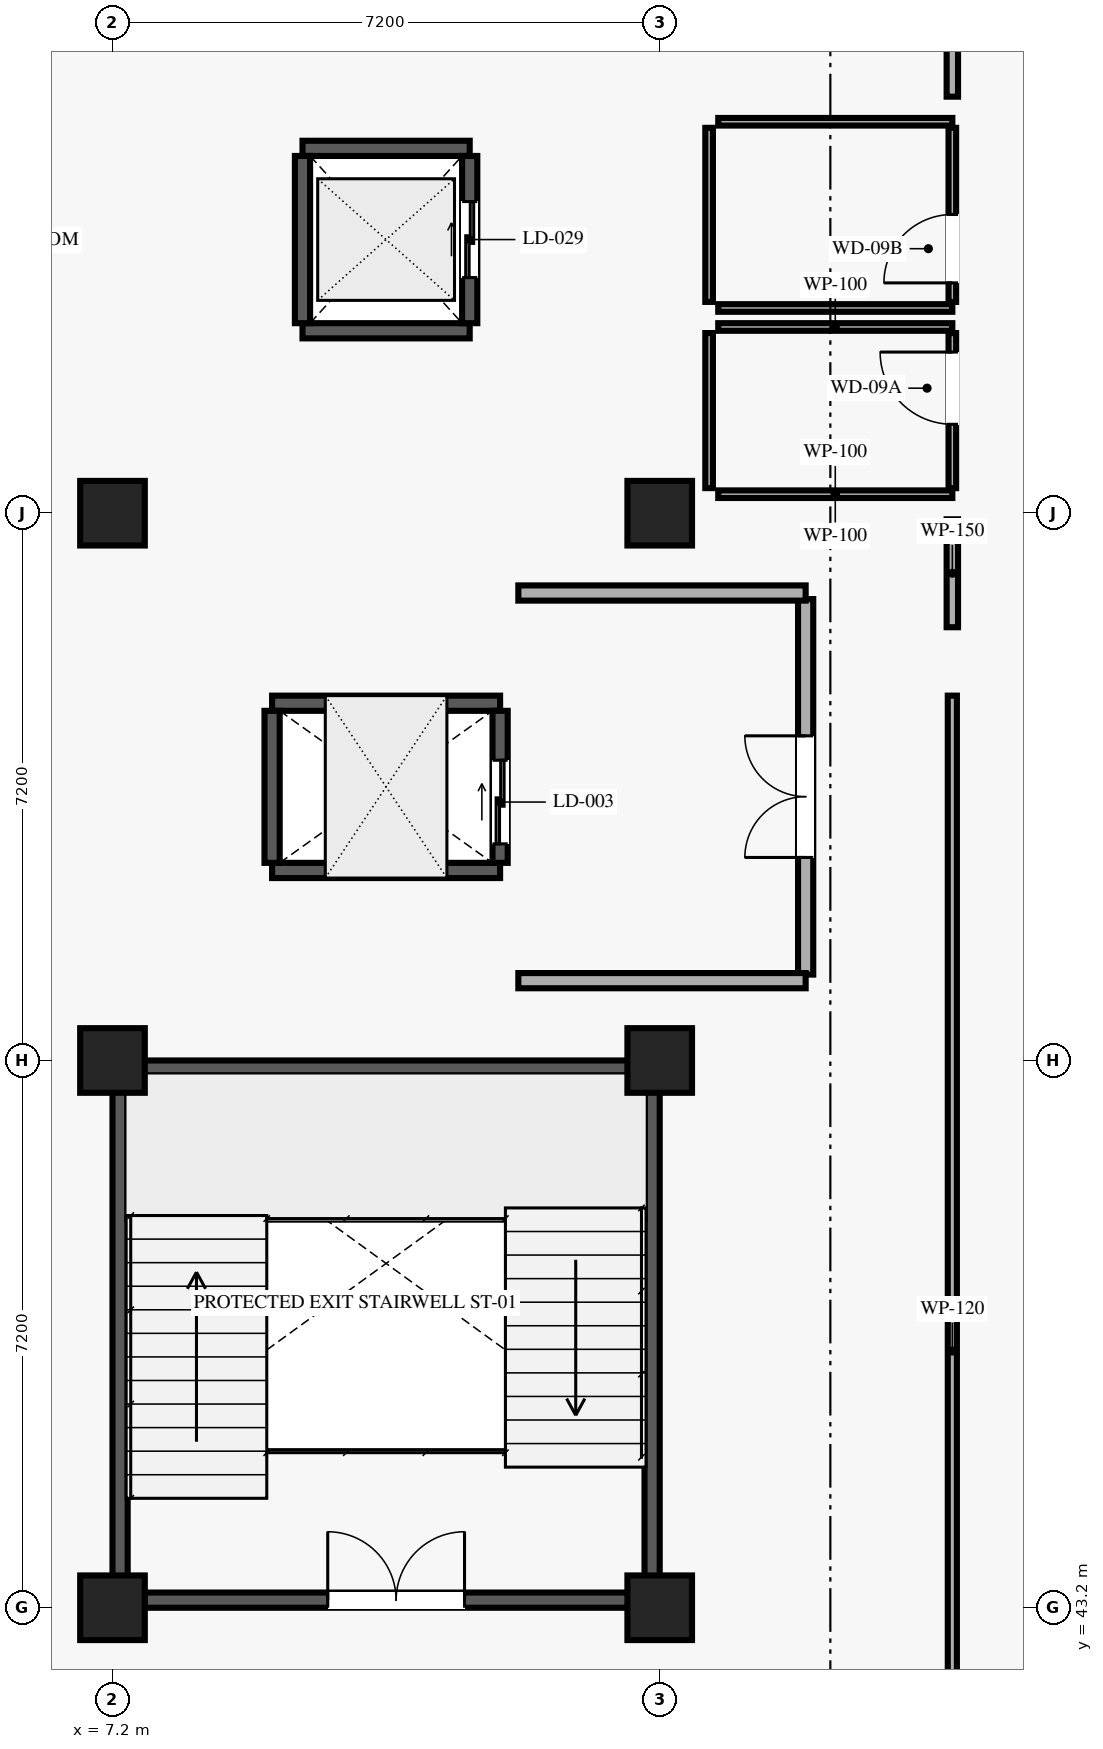
"""IFC4 building model, lengths in metres.
Left out: names, types, materials, properties, quantities, classifications, styles, units other than length and angle.
Written with IfcOpenShell. Run it as: python <this file> out.ifc"""

import sys

from ifc_helpers import new_model, si_unit, direction, frame, frame_2d, origin, origin_2d, place, context, subcontext, project, spatial, rectangle, extrude, element, fill, save


model = new_model("IFC4")
c1 = context("Model", 3, precision=1e-05, world=origin(), true_north=direction((0.0, 1.0)))
c2 = subcontext(c1, "Body", "Model", "MODEL_VIEW")
j1 = project(units=[si_unit("LENGTHUNIT", "METRE"), si_unit("PLANEANGLEUNIT", "RADIAN")], contexts=[c1])
p1 = place(None, origin())
s1 = spatial("IfcSite", under=j1, at=p1, CompositionType="ELEMENT")
p2 = place(p1, origin())
s2 = spatial("IfcBuilding", under=s1, at=p2, CompositionType="ELEMENT")
p3 = place(p2, frame((0.0, 0.0, 5.4)))
s3 = spatial("IfcBuildingStorey", under=s2, at=p3, CompositionType="ELEMENT", Elevation=5.4)
for number, where, z_axis, x_axis in (
    (1, (7.2, 43.2, 0.0), (0.0, 0.0, 1.0), (1.0, 0.0, 0.0)),
    (2, (7.2, 50.4, 0.0), (0.0, 0.0, 1.0), (1.0, 0.0, 0.0)),
    (3, (7.2, 57.6, 0.0), (0.0, 0.0, 1.0), (1.0, 0.0, 0.0)),
    (4, (14.4, 43.2, 0.0), (0.0, 0.0, 1.0), (1.0, 0.0, 0.0)),
    (5, (14.4, 50.4, 0.0), (0.0, 0.0, 1.0), (1.0, 0.0, 0.0)),
    (6, (14.4, 57.6, 0.0), (0.0, 0.0, 1.0), (1.0, 0.0, 0.0)),
):
    element("IfcColumn", number, at=place(p3, frame(where, z_axis=z_axis, x_axis=x_axis)), inside=s3, PredefinedType="COLUMN", context=c2, shape_type="SweptSolid", body=[
        extrude(rectangle(XDim=0.85, YDim=0.85, at=origin_2d()), origin(), (0.0, 0.0, 1.0), 4.05),
    ])
p4 = place(p3, frame((7.4, 43.3, 0.0), z_axis=(0.0, 0.0, 1.0), x_axis=(1.0, 0.0, 0.0)))
e7 = element("IfcWall", 7, at=p4, inside=s3, PredefinedType="SHEAR", context=c2, shape_type="SweptSolid", body=[
    extrude(rectangle(XDim=6.8, YDim=0.2, at=frame_2d((3.4, 0.0))), origin(), (0.0, 0.0, 1.0), 3.81),
])
p5 = place(p4, frame((2.632, 0.0, 0.0)))
e8 = element("IfcOpeningElement", 8, at=p5, cuts=e7, PredefinedType="OPENING", context=c2, shape_type="SweptSolid", body=[
    extrude(rectangle(XDim=1.8, YDim=2.2, at=frame_2d((0.9, 1.1))), frame((0.0, 0.11, 0.0), z_axis=(0.0, -1.0, 0.0), x_axis=(1.0, 0.0, 0.0)), (0.0, 0.0, 1.0), 0.22),
])
for number, where, z_axis, x_axis in (
    (9, (7.4, 50.3, 0.0), (0.0, 0.0, 1.0), (1.0, 0.0, 0.0)),
    (10, (7.3, 43.4, 0.0), (0.0, 0.0, 1.0), (0.0, 1.0, 0.0)),
    (11, (14.3, 43.4, 0.0), (0.0, 0.0, 1.0), (0.0, 1.0, 0.0)),
):
    element("IfcWall", number, at=place(p3, frame(where, z_axis=z_axis, x_axis=x_axis)), inside=s3, PredefinedType="SHEAR", context=c2, shape_type="SweptSolid", body=[
        extrude(rectangle(XDim=6.8, YDim=0.2, at=frame_2d((3.4, 0.0))), origin(), (0.0, 0.0, 1.0), 3.81),
    ])
for number, where, z_axis, x_axis in (
    (12, (9.3, 52.9, 0.0), (0.0, 0.0, 1.0), (1.0, 0.0, 0.0)),
    (13, (9.3, 55.1, 0.0), (0.0, 0.0, 1.0), (1.0, 0.0, 0.0)),
):
    element("IfcWall", number, at=place(p3, frame(where, z_axis=z_axis, x_axis=x_axis)), inside=s3, PredefinedType="SHEAR", context=c2, shape_type="SweptSolid", body=[
        extrude(rectangle(XDim=3.0, YDim=0.2, at=frame_2d((1.5, 0.0))), origin(), (0.0, 0.0, 1.0), 3.81),
    ])
p6 = place(p3, frame((9.3, 53.0, 0.0), z_axis=(0.0, 0.0, 1.0), x_axis=(0.0, 1.0, 0.0)))
e14 = element("IfcWall", 14, at=p6, inside=s3, PredefinedType="SHEAR", context=c2, shape_type="SweptSolid", body=[
    extrude(rectangle(XDim=2.0, YDim=0.2, at=frame_2d((1.0, 0.0))), origin(), (0.0, 0.0, 1.0), 3.81),
])
p7 = place(p3, frame((12.3, 53.0, 0.0), z_axis=(0.0, 0.0, 1.0), x_axis=(0.0, 1.0, 0.0)))
e15 = element("IfcWall", 15, at=p7, inside=s3, PredefinedType="SHEAR", context=c2, shape_type="SweptSolid", body=[
    extrude(rectangle(XDim=2.0, YDim=0.2, at=frame_2d((1.0, 0.0))), origin(), (0.0, 0.0, 1.0), 3.81),
])
p8 = place(p7, frame((0.25, 0.0, 0.0)))
e16 = element("IfcOpeningElement", 16, at=p8, cuts=e15, PredefinedType="OPENING", context=c2, shape_type="SweptSolid", body=[
    extrude(rectangle(XDim=1.1, YDim=2.15, at=frame_2d((0.55, 1.075))), frame((0.0, 0.11, 0.0), z_axis=(0.0, -1.0, 0.0), x_axis=(1.0, 0.0, 0.0)), (0.0, 0.0, 1.0), 0.22),
])
for number, where, z_axis, x_axis in (
    (17, (9.7, 60.0, 0.0), (0.0, 0.0, 1.0), (1.0, 0.0, 0.0)),
    (18, (9.7, 62.4, 0.0), (0.0, 0.0, 1.0), (1.0, 0.0, 0.0)),
    (19, (9.7, 60.1, 0.0), (0.0, 0.0, 1.0), (0.0, 1.0, 0.0)),
):
    element("IfcWall", number, at=place(p3, frame(where, z_axis=z_axis, x_axis=x_axis)), inside=s3, PredefinedType="SHEAR", context=c2, shape_type="SweptSolid", body=[
        extrude(rectangle(XDim=2.2, YDim=0.2, at=frame_2d((1.1, 0.0))), origin(), (0.0, 0.0, 1.0), 3.81),
    ])
p9 = place(p3, frame((11.9, 60.1, 0.0), z_axis=(0.0, 0.0, 1.0), x_axis=(0.0, 1.0, 0.0)))
e20 = element("IfcWall", 20, at=p9, inside=s3, PredefinedType="SHEAR", context=c2, shape_type="SweptSolid", body=[
    extrude(rectangle(XDim=2.2, YDim=0.2, at=frame_2d((1.1, 0.0))), origin(), (0.0, 0.0, 1.0), 3.81),
])
p10 = place(p9, frame((0.6, 0.0, 0.0)))
e21 = element("IfcOpeningElement", 21, at=p10, cuts=e20, PredefinedType="OPENING", context=c2, shape_type="SweptSolid", body=[
    extrude(rectangle(XDim=1.0, YDim=2.1, at=frame_2d((0.5, 1.05))), frame((0.0, 0.11, 0.0), z_axis=(0.0, -1.0, 0.0), x_axis=(1.0, 0.0, 0.0)), (0.0, 0.0, 1.0), 0.22),
])
p11 = place(p3, frame((16.32, 51.53, 0.0), z_axis=(0.0, 0.0, 1.0), x_axis=(0.0, 1.0, 0.0)))
e22 = element("IfcWall", 22, at=p11, inside=s3, PredefinedType="SOLIDWALL", context=c2, shape_type="SweptSolid", body=[
    extrude(rectangle(XDim=4.94, YDim=0.2, at=frame_2d((2.47, 0.0))), origin(), (0.0, 0.0, 1.0), 3.81),
])
p12 = place(p11, frame((1.541, 0.0, 0.0)))
e23 = element("IfcOpeningElement", 23, at=p12, cuts=e22, PredefinedType="OPENING", context=c2, shape_type="SweptSolid", body=[
    extrude(rectangle(XDim=1.6, YDim=2.2, at=frame_2d((0.8, 1.1))), frame((0.0, 0.11, 0.0), z_axis=(0.0, -1.0, 0.0), x_axis=(1.0, 0.0, 0.0)), (0.0, 0.0, 1.0), 0.22),
])
for number, where, z_axis, x_axis in (
    (24, (12.54, 51.45, 0.0), (0.0, 0.0, 1.0), (1.0, 0.0, 0.0)),
    (25, (12.54, 56.55, 0.0), (0.0, 0.0, 1.0), (1.0, 0.0, 0.0)),
):
    element("IfcWall", number, at=place(p3, frame(where, z_axis=z_axis, x_axis=x_axis)), inside=s3, PredefinedType="SOLIDWALL", context=c2, shape_type="SweptSolid", body=[
        extrude(rectangle(XDim=3.78, YDim=0.2, at=frame_2d((1.89, 0.0))), origin(), (0.0, 0.0, 1.0), 3.81),
    ])
p13 = place(p3, frame((18.25, 57.93, 0.0), z_axis=(0.0, 0.0, 1.0), x_axis=(0.0, 1.0, 0.0)))
e26 = element("IfcWall", 26, at=p13, inside=s3, PredefinedType="PARTITIONING", context=c2, shape_type="SweptSolid", body=[
    extrude(rectangle(XDim=2.04, YDim=0.1, at=frame_2d((1.02, 0.0))), origin(), (0.0, 0.0, 1.0), 3.81),
])
p14 = place(p13, frame((0.84, 0.0, 0.0)))
e27 = element("IfcOpeningElement", 27, at=p14, cuts=e26, PredefinedType="OPENING", context=c2, shape_type="SweptSolid", body=[
    extrude(rectangle(XDim=0.95, YDim=2.1, at=frame_2d((0.475, 1.05))), frame((0.0, 0.06, 0.0), z_axis=(0.0, -1.0, 0.0), x_axis=(1.0, 0.0, 0.0)), (0.0, 0.0, 1.0), 0.12),
])
p15 = place(p3, frame((15.17, 57.85, 0.0), z_axis=(0.0, 0.0, 1.0), x_axis=(1.0, 0.0, 0.0)))
e28 = element("IfcWall", 28, at=p15, inside=s3, PredefinedType="PARTITIONING", context=c2, shape_type="SweptSolid", body=[
    extrude(rectangle(XDim=3.08, YDim=0.1, at=frame_2d((1.54, 0.0))), origin(), (0.0, 0.0, 1.0), 3.2),
])
p16 = place(p3, frame((15.17, 60.05, 0.0), z_axis=(0.0, 0.0, 1.0), x_axis=(1.0, 0.0, 0.0)))
e29 = element("IfcWall", 29, at=p16, inside=s3, PredefinedType="PARTITIONING", context=c2, shape_type="SweptSolid", body=[
    extrude(rectangle(XDim=3.08, YDim=0.1, at=frame_2d((1.54, 0.0))), origin(), (0.0, 0.0, 1.0), 3.81),
])
p17 = place(p3, frame((15.05, 57.93, 0.0), z_axis=(0.0, 0.0, 1.0), x_axis=(0.0, 1.0, 0.0)))
e30 = element("IfcWall", 30, at=p17, inside=s3, PredefinedType="PARTITIONING", context=c2, shape_type="SweptSolid", body=[
    extrude(rectangle(XDim=2.04, YDim=0.1, at=frame_2d((1.02, 0.0))), origin(), (0.0, 0.0, 1.0), 3.81),
])
p18 = place(p3, frame((18.25, 60.38, 0.0), z_axis=(0.0, 0.0, 1.0), x_axis=(0.0, 1.0, 0.0)))
e31 = element("IfcWall", 31, at=p18, inside=s3, PredefinedType="PARTITIONING", context=c2, shape_type="SweptSolid", body=[
    extrude(rectangle(XDim=2.29, YDim=0.1, at=frame_2d((1.145, 0.0))), origin(), (0.0, 0.0, 1.0), 3.81),
])
p19 = place(p18, frame((0.25, 0.0, 0.0)))
e32 = element("IfcOpeningElement", 32, at=p19, cuts=e31, PredefinedType="OPENING", context=c2, shape_type="SweptSolid", body=[
    extrude(rectangle(XDim=0.9, YDim=2.1, at=frame_2d((0.45, 1.05))), frame((0.0, 0.06, 0.0), z_axis=(0.0, -1.0, 0.0), x_axis=(1.0, 0.0, 0.0)), (0.0, 0.0, 1.0), 0.12),
])
for number, where, z_axis, x_axis in (
    (33, (15.17, 60.3, 0.0), (0.0, 0.0, 1.0), (1.0, 0.0, 0.0)),
    (34, (15.17, 62.75, 0.0), (0.0, 0.0, 1.0), (1.0, 0.0, 0.0)),
):
    element("IfcWall", number, at=place(p3, frame(where, z_axis=z_axis, x_axis=x_axis)), inside=s3, PredefinedType="PARTITIONING", context=c2, shape_type="SweptSolid", body=[
        extrude(rectangle(XDim=3.08, YDim=0.1, at=frame_2d((1.54, 0.0))), origin(), (0.0, 0.0, 1.0), 3.81),
    ])
p20 = place(p3, frame((15.05, 60.38, 0.0), z_axis=(0.0, 0.0, 1.0), x_axis=(0.0, 1.0, 0.0)))
e35 = element("IfcWall", 35, at=p20, inside=s3, PredefinedType="PARTITIONING", context=c2, shape_type="SweptSolid", body=[
    extrude(rectangle(XDim=2.29, YDim=0.1, at=frame_2d((1.145, 0.0))), origin(), (0.0, 0.0, 1.0), 3.81),
])
p21 = place(p3, frame((18.25, 36.55, 0.0), z_axis=(0.0, 0.0, 1.0), x_axis=(0.0, 1.0, 0.0)))
e36 = element("IfcWall", 36, at=p21, inside=s3, PredefinedType="PARTITIONING", context=c2, shape_type="SweptSolid", body=[
    extrude(rectangle(XDim=18.65, YDim=0.12, at=frame_2d((9.325, 0.0))), origin(), (0.0, 0.0, 1.0), 3.81),
])
p22 = place(p21, frame((2.513, 0.0, 0.0)))
e37 = element("IfcOpeningElement", 37, at=p22, cuts=e36, PredefinedType="OPENING", context=c2, shape_type="SweptSolid", body=[
    extrude(rectangle(XDim=1.05, YDim=2.15, at=frame_2d((0.525, 1.075))), frame((0.0, 0.07, 0.0), z_axis=(0.0, -1.0, 0.0), x_axis=(1.0, 0.0, 0.0)), (0.0, 0.0, 1.0), 0.14),
])
p23 = place(p3, frame((18.25, 63.08, 0.0), z_axis=(0.0, 0.0, 1.0), x_axis=(0.0, 1.0, 0.0)))
e38 = element("IfcWall", 38, at=p23, inside=s3, PredefinedType="PARTITIONING", context=c2, shape_type="SweptSolid", body=[
    extrude(rectangle(XDim=8.62, YDim=0.15, at=frame_2d((4.31, 0.0))), origin(), (0.0, 0.0, 1.0), 3.81),
])
p24 = place(p23, frame((4.827, 0.0, 0.0)))
e39 = element("IfcOpeningElement", 39, at=p24, cuts=e38, PredefinedType="OPENING", context=c2, shape_type="SweptSolid", body=[
    extrude(rectangle(XDim=1.0, YDim=2.1, at=frame_2d((0.5, 1.05))), frame((0.0, 0.085, 0.0), z_axis=(0.0, -1.0, 0.0), x_axis=(1.0, 0.0, 0.0)), (0.0, 0.0, 1.0), 0.17),
])
p25 = place(p3, frame((18.25, 56.1, 0.0), z_axis=(0.0, 0.0, 1.0), x_axis=(0.0, 1.0, 0.0)))
e40 = element("IfcWall", 40, at=p25, inside=s3, PredefinedType="PARTITIONING", context=c2, shape_type="SweptSolid", body=[
    extrude(rectangle(XDim=1.42, YDim=0.15, at=frame_2d((0.71, 0.0))), origin(), (0.0, 0.0, 1.0), 3.81),
])
p26 = place(p5, origin())
e41 = element("IfcDoor", 41, at=p26, inside=s3, OperationType="DOUBLE_DOOR_SINGLE_SWING", PredefinedType="DOOR", context=c2, shape_type="SweptSolid", body=[
    extrude(rectangle(XDim=1.8, YDim=2.2, at=frame_2d((0.9, 1.1))), frame((0.0, 0.025, 0.0), z_axis=(0.0, -1.0, 0.0), x_axis=(1.0, 0.0, 0.0)), (0.0, 0.0, 1.0), 0.05),
])
fill(e8, e41)
p27 = place(p8, origin())
e42 = element("IfcDoor", 42, at=p27, inside=s3, OperationType="DOUBLE_DOOR_SLIDING", PredefinedType="DOOR", context=c2, shape_type="SweptSolid", body=[
    extrude(rectangle(XDim=1.1, YDim=2.15, at=frame_2d((0.55, 1.075))), frame((0.0, 0.025, 0.0), z_axis=(0.0, -1.0, 0.0), x_axis=(1.0, 0.0, 0.0)), (0.0, 0.0, 1.0), 0.05),
])
fill(e16, e42)
p28 = place(p10, origin())
e43 = element("IfcDoor", 43, at=p28, inside=s3, OperationType="DOUBLE_DOOR_SLIDING", PredefinedType="DOOR", context=c2, shape_type="SweptSolid", body=[
    extrude(rectangle(XDim=1.0, YDim=2.1, at=frame_2d((0.5, 1.05))), frame((0.0, 0.025, 0.0), z_axis=(0.0, -1.0, 0.0), x_axis=(1.0, 0.0, 0.0)), (0.0, 0.0, 1.0), 0.05),
])
fill(e21, e43)
p29 = place(p12, origin())
e44 = element("IfcDoor", 44, at=p29, inside=s3, OperationType="DOUBLE_DOOR_SINGLE_SWING", PredefinedType="DOOR", context=c2, shape_type="SweptSolid", body=[
    extrude(rectangle(XDim=1.6, YDim=2.2, at=frame_2d((0.8, 1.1))), frame((0.0, 0.025, 0.0), z_axis=(0.0, -1.0, 0.0), x_axis=(1.0, 0.0, 0.0)), (0.0, 0.0, 1.0), 0.05),
])
fill(e23, e44)
p30 = place(p14, origin())
e45 = element("IfcDoor", 45, at=p30, inside=s3, OperationType="SINGLE_SWING_RIGHT", PredefinedType="DOOR", context=c2, shape_type="SweptSolid", body=[
    extrude(rectangle(XDim=0.95, YDim=2.1, at=frame_2d((0.475, 1.05))), frame((0.0, 0.025, 0.0), z_axis=(0.0, -1.0, 0.0), x_axis=(1.0, 0.0, 0.0)), (0.0, 0.0, 1.0), 0.05),
])
fill(e27, e45)
p31 = place(p19, origin())
e46 = element("IfcDoor", 46, at=p31, inside=s3, OperationType="SINGLE_SWING_LEFT", PredefinedType="DOOR", context=c2, shape_type="SweptSolid", body=[
    extrude(rectangle(XDim=0.9, YDim=2.1, at=frame_2d((0.45, 1.05))), frame((0.0, 0.025, 0.0), z_axis=(0.0, -1.0, 0.0), x_axis=(1.0, 0.0, 0.0)), (0.0, 0.0, 1.0), 0.05),
])
fill(e32, e46)
save(model, sys.argv[1])
